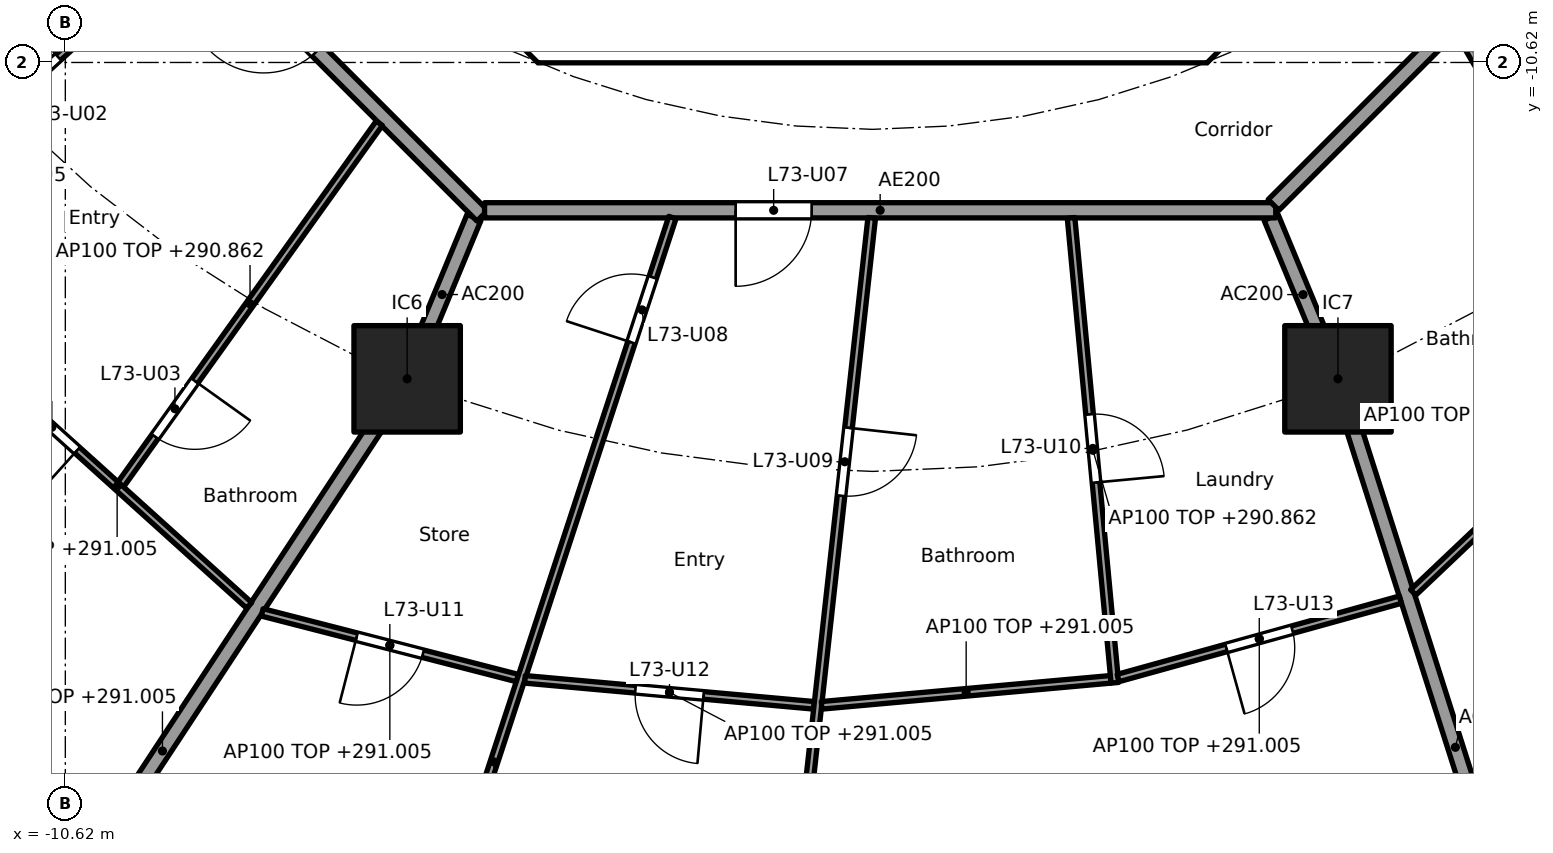
"""IFC4 building model, lengths in metres.
Left out: names, types, materials, properties, quantities, classifications, styles, units other than length and angle.
Written with IfcOpenShell. Run it as: python <this file> out.ifc"""

import sys

from ifc_helpers import new_model, si_unit, direction, frame, frame_2d, origin, origin_2d, place, context, subcontext, project, spatial, polyline, rectangle, outline, extrude, element, fill, save


model = new_model("IFC4")
c1 = context("Model", 3, precision=1e-05, world=origin(), true_north=direction((0.0, 1.0)))
c2 = subcontext(c1, "Body", "Model", "MODEL_VIEW")
j1 = project(units=[si_unit("LENGTHUNIT", "METRE"), si_unit("PLANEANGLEUNIT", "RADIAN")], contexts=[c1])
p1 = place(None, origin())
s1 = spatial("IfcSite", under=j1, at=p1, CompositionType="ELEMENT")
p2 = place(p1, origin())
s2 = spatial("IfcBuilding", under=s1, at=p2, CompositionType="ELEMENT")
p3 = place(p2, frame((0.0, 0.0, 288.1)))
s3 = spatial("IfcBuildingStorey", under=s2, at=p3, CompositionType="ELEMENT", Elevation=288.1)
for number, where, z_axis, x_axis in (
    (1, (-6.123, -14.782, 0.0), (0.0, 0.0, 1.0), (1.0, 0.0, 0.0)),
    (2, (6.123, -14.782, 0.0), (0.0, 0.0, 1.0), (1.0, 0.0, 0.0)),
):
    element("IfcColumn", number, at=place(p3, frame(where, z_axis=z_axis, x_axis=x_axis)), inside=s3, PredefinedType="COLUMN", context=c2, shape_type="SweptSolid", body=[
        extrude(rectangle(XDim=1.4, YDim=1.4, at=origin_2d()), origin(), (0.0, 0.0, 1.0), 3.7),
    ])
p4 = place(p3, origin())
e3 = element("IfcWall", 3, at=p4, inside=s3, PredefinedType="SHEAR", context=c2, shape_type="SweptSolid", body=[
    extrude(outline(polyline([(-4.152, -10.025), (4.152, -10.025), (4.401, -9.776), (4.825, -10.2), (4.401, -10.625), (-4.401, -10.625), (-4.825, -10.2), (-4.401, -9.776), (-4.152, -10.025)])), origin(), (0.0, 0.0, 1.0), 3.44),
])
p5 = place(p3, frame((-5.243, -12.657, 0.0), z_axis=(0.0, 0.0, 1.0), x_axis=(-0.382770106157, -0.923843626288, 0.0)))
e4 = element("IfcWall", 4, at=p5, inside=s3, PredefinedType="PARTITIONING", context=c2, shape_type="SweptSolid", body=[
    extrude(rectangle(XDim=2.199, YDim=0.2, at=frame_2d((1.1, 0.0))), origin(), (0.0, 0.0, 1.0), 3.44),
])
p6 = place(p3, frame((-6.151, -14.824, 0.0), z_axis=(0.0, 0.0, 1.0), x_axis=(-0.549345577828, -0.835595258556, 0.0)))
e5 = element("IfcWall", 5, at=p6, inside=s3, PredefinedType="PARTITIONING", context=c2, shape_type="SweptSolid", body=[
    extrude(rectangle(XDim=11.62, YDim=0.2, at=frame_2d((5.81, 0.0))), origin(), (0.0, 0.0, 1.0), 2.905),
])
p7 = place(p3, frame((5.243, -12.657, 0.0), z_axis=(0.0, 0.0, 1.0), x_axis=(0.382707856524, -0.923869415315, 0.0)))
e6 = element("IfcWall", 6, at=p7, inside=s3, PredefinedType="PARTITIONING", context=c2, shape_type="SweptSolid", body=[
    extrude(rectangle(XDim=2.2, YDim=0.2, at=frame_2d((1.1, 0.0))), origin(), (0.0, 0.0, 1.0), 3.44),
])
p8 = place(p3, frame((6.138, -14.83, 0.0), z_axis=(0.0, 0.0, 1.0), x_axis=(0.303653679037, -0.952782474234, 0.0)))
e7 = element("IfcWall", 7, at=p8, inside=s3, PredefinedType="PARTITIONING", context=c2, shape_type="SweptSolid", body=[
    extrude(rectangle(XDim=10.076, YDim=0.2, at=frame_2d((5.038, 0.0))), origin(), (0.0, 0.0, 1.0), 2.905),
])
p9 = place(p3, frame((-12.635, -5.134, 0.0), z_axis=(0.0, 0.0, 1.0), x_axis=(0.707106781187, -0.707106781187, 0.0)))
e8 = element("IfcWall", 8, at=p9, inside=s3, PredefinedType="PARTITIONING", context=c2, shape_type="SweptSolid", body=[
    extrude(rectangle(XDim=10.609, YDim=0.2, at=frame_2d((5.305, 0.0))), origin(), (0.0, 0.0, 1.0), 3.44),
])
p10 = place(p9, frame((6.539, 0.0, 0.0)))
e9 = element("IfcOpeningElement", 9, at=p10, cuts=e8, PredefinedType="OPENING", context=c2, shape_type="SweptSolid", body=[
    extrude(rectangle(XDim=1.0, YDim=2.1, at=frame_2d((0.5, 1.05))), frame((0.0, 0.11, 0.0), z_axis=(0.0, -1.0, 0.0), x_axis=(1.0, 0.0, 0.0)), (0.0, 0.0, 1.0), 0.22),
])
p11 = place(p3, frame((-5.104, -12.565, 0.0), z_axis=(0.0, 0.0, 1.0), x_axis=(1.0, 0.0, 0.0)))
e10 = element("IfcWall", 10, at=p11, inside=s3, PredefinedType="PARTITIONING", context=c2, shape_type="SweptSolid", body=[
    extrude(rectangle(XDim=10.409, YDim=0.2, at=frame_2d((5.205, 0.0))), origin(), (0.0, 0.0, 1.0), 3.44),
])
p12 = place(p11, frame((3.303, 0.0, 0.0)))
e11 = element("IfcOpeningElement", 11, at=p12, cuts=e10, PredefinedType="OPENING", context=c2, shape_type="SweptSolid", body=[
    extrude(rectangle(XDim=1.0, YDim=2.1, at=frame_2d((0.5, 1.05))), frame((0.0, 0.11, 0.0), z_axis=(0.0, -1.0, 0.0), x_axis=(1.0, 0.0, 0.0)), (0.0, 0.0, 1.0), 0.22),
])
p13 = place(p3, frame((5.275, -12.494, 0.0), z_axis=(0.0, 0.0, 1.0), x_axis=(0.707106781187, 0.707106781187, 0.0)))
e12 = element("IfcWall", 12, at=p13, inside=s3, PredefinedType="PARTITIONING", context=c2, shape_type="SweptSolid", body=[
    extrude(rectangle(XDim=10.409, YDim=0.2, at=frame_2d((5.205, 0.0))), origin(), (0.0, 0.0, 1.0), 3.44),
])
p14 = place(p13, frame((4.604, 0.0, 0.0)))
e13 = element("IfcOpeningElement", 13, at=p14, cuts=e12, PredefinedType="OPENING", context=c2, shape_type="SweptSolid", body=[
    extrude(rectangle(XDim=1.0, YDim=2.1, at=frame_2d((0.5, 1.05))), frame((0.0, 0.11, 0.0), z_axis=(0.0, -1.0, 0.0), x_axis=(1.0, 0.0, 0.0)), (0.0, 0.0, 1.0), 0.22),
])
p15 = place(p3, frame((-8.958, -8.952, 0.0), z_axis=(0.0, 0.0, 1.0), x_axis=(-0.73876526954, -0.673962815385, 0.0)))
e14 = element("IfcWall", 14, at=p15, inside=s3, PredefinedType="PARTITIONING", context=c2, shape_type="SweptSolid", body=[
    extrude(rectangle(XDim=5.647, YDim=0.1, at=frame_2d((2.824, 0.0))), origin(), (0.0, 0.0, 1.0), 2.762),
])
p16 = place(p15, frame((2.374, 0.0, 0.0)))
e15 = element("IfcOpeningElement", 15, at=p16, cuts=e14, PredefinedType="OPENING", context=c2, shape_type="SweptSolid", body=[
    extrude(rectangle(XDim=0.9, YDim=2.1, at=frame_2d((0.45, 1.05))), frame((0.0, 0.06, 0.0), z_axis=(0.0, -1.0, 0.0), x_axis=(1.0, 0.0, 0.0)), (0.0, 0.0, 1.0), 0.12),
])
p17 = place(p3, frame((-11.676, -14.628, 0.0), z_axis=(0.0, 0.0, 1.0), x_axis=(0.74245829867, -0.669892285921, 0.0)))
e16 = element("IfcWall", 16, at=p17, inside=s3, PredefinedType="PARTITIONING", context=c2, shape_type="SweptSolid", body=[
    extrude(rectangle(XDim=4.68, YDim=0.1, at=frame_2d((2.34, 0.0))), origin(), (0.0, 0.0, 1.0), 2.905),
])
p18 = place(p17, frame((0.732, 0.0, 0.0)))
e17 = element("IfcOpeningElement", 17, at=p18, cuts=e16, PredefinedType="OPENING", context=c2, shape_type="SweptSolid", body=[
    extrude(rectangle(XDim=0.9, YDim=2.1, at=frame_2d((0.45, 1.05))), frame((0.0, 0.06, 0.0), z_axis=(0.0, -1.0, 0.0), x_axis=(1.0, 0.0, 0.0)), (0.0, 0.0, 1.0), 0.12),
])
p19 = place(p3, frame((-6.49, -11.419, 0.0), z_axis=(0.0, 0.0, 1.0), x_axis=(-0.58201647594, -0.813176992871, 0.0)))
e18 = element("IfcWall", 18, at=p19, inside=s3, PredefinedType="PARTITIONING", context=c2, shape_type="SweptSolid", body=[
    extrude(rectangle(XDim=5.844, YDim=0.1, at=frame_2d((2.922, 0.0))), origin(), (0.0, 0.0, 1.0), 2.762),
])
p20 = place(p19, frame((4.169, 0.0, 0.0)))
e19 = element("IfcOpeningElement", 19, at=p20, cuts=e18, PredefinedType="OPENING", context=c2, shape_type="SweptSolid", body=[
    extrude(rectangle(XDim=0.9, YDim=2.1, at=frame_2d((0.45, 1.05))), frame((0.0, 0.06, 0.0), z_axis=(0.0, -1.0, 0.0), x_axis=(1.0, 0.0, 0.0)), (0.0, 0.0, 1.0), 0.12),
])
p21 = place(p3, frame((-8.03, -17.854, 0.0), z_axis=(0.0, 0.0, 1.0), x_axis=(0.968441967324, -0.249239154077, 0.0)))
e20 = element("IfcWall", 20, at=p21, inside=s3, PredefinedType="PARTITIONING", context=c2, shape_type="SweptSolid", body=[
    extrude(rectangle(XDim=3.468, YDim=0.1, at=frame_2d((1.734, 0.0))), origin(), (0.0, 0.0, 1.0), 2.905),
])
p22 = place(p21, frame((1.284, 0.0, 0.0)))
e21 = element("IfcOpeningElement", 21, at=p22, cuts=e20, PredefinedType="OPENING", context=c2, shape_type="SweptSolid", body=[
    extrude(rectangle(XDim=0.9, YDim=2.1, at=frame_2d((0.45, 1.05))), frame((0.0, 0.06, 0.0), z_axis=(0.0, -1.0, 0.0), x_axis=(1.0, 0.0, 0.0)), (0.0, 0.0, 1.0), 0.12),
])
p23 = place(p3, frame((-2.633, -12.66, 0.0), z_axis=(0.0, 0.0, 1.0), x_axis=(-0.311432955908, -0.950268127412, 0.0)))
e22 = element("IfcWall", 22, at=p23, inside=s3, PredefinedType="PARTITIONING", context=c2, shape_type="SweptSolid", body=[
    extrude(rectangle(XDim=15.074, YDim=0.1, at=frame_2d((7.537, 0.0))), origin(), (0.0, 0.0, 1.0), 2.762),
])
p24 = place(p23, frame((0.829, 0.0, 0.0)))
e23 = element("IfcOpeningElement", 23, at=p24, cuts=e22, PredefinedType="OPENING", context=c2, shape_type="SweptSolid", body=[
    extrude(rectangle(XDim=0.9, YDim=2.1, at=frame_2d((0.45, 1.05))), frame((0.0, 0.06, 0.0), z_axis=(0.0, -1.0, 0.0), x_axis=(1.0, 0.0, 0.0)), (0.0, 0.0, 1.0), 0.12),
])
p25 = place(p3, frame((-4.573, -18.736, 0.0), z_axis=(0.0, 0.0, 1.0), x_axis=(0.995986472869, -0.089503887414, 0.0)))
e24 = element("IfcWall", 24, at=p25, inside=s3, PredefinedType="PARTITIONING", context=c2, shape_type="SweptSolid", body=[
    extrude(rectangle(XDim=3.819, YDim=0.1, at=frame_2d((1.909, 0.0))), origin(), (0.0, 0.0, 1.0), 2.905),
])
p26 = place(p25, frame((1.459, 0.0, 0.0)))
e25 = element("IfcOpeningElement", 25, at=p26, cuts=e24, PredefinedType="OPENING", context=c2, shape_type="SweptSolid", body=[
    extrude(rectangle(XDim=0.9, YDim=2.1, at=frame_2d((0.45, 1.05))), frame((0.0, 0.06, 0.0), z_axis=(0.0, -1.0, 0.0), x_axis=(1.0, 0.0, 0.0)), (0.0, 0.0, 1.0), 0.12),
])
p27 = place(p3, frame((-0.011, -12.664, 0.0), z_axis=(0.0, 0.0, 1.0), x_axis=(-0.109805889692, -0.993953050495, 0.0)))
e26 = element("IfcWall", 26, at=p27, inside=s3, PredefinedType="PARTITIONING", context=c2, shape_type="SweptSolid", body=[
    extrude(rectangle(XDim=15.248, YDim=0.1, at=frame_2d((7.624, 0.0))), origin(), (0.0, 0.0, 1.0), 2.762),
])
p28 = place(p27, frame((2.778, 0.0, 0.0)))
e27 = element("IfcOpeningElement", 27, at=p28, cuts=e26, PredefinedType="OPENING", context=c2, shape_type="SweptSolid", body=[
    extrude(rectangle(XDim=0.9, YDim=2.1, at=frame_2d((0.45, 1.05))), frame((0.0, 0.06, 0.0), z_axis=(0.0, -1.0, 0.0), x_axis=(1.0, 0.0, 0.0)), (0.0, 0.0, 1.0), 0.12),
])
p29 = place(p3, frame((-0.67, -19.077, 0.0), z_axis=(0.0, 0.0, 1.0), x_axis=(0.995986472869, 0.089503887414, 0.0)))
e28 = element("IfcWall", 28, at=p29, inside=s3, PredefinedType="PARTITIONING", context=c2, shape_type="SweptSolid", body=[
    extrude(rectangle(XDim=3.819, YDim=0.1, at=frame_2d((1.909, 0.0))), origin(), (0.0, 0.0, 1.0), 2.905),
])
p30 = place(p3, frame((2.612, -12.664, 0.0), z_axis=(0.0, 0.0, 1.0), x_axis=(0.093781393779, -0.995592813444, 0.0)))
e29 = element("IfcWall", 29, at=p30, inside=s3, PredefinedType="PARTITIONING", context=c2, shape_type="SweptSolid", body=[
    extrude(rectangle(XDim=6.144, YDim=0.1, at=frame_2d((3.072, 0.0))), origin(), (0.0, 0.0, 1.0), 2.762),
])
p31 = place(p30, frame((2.597, 0.0, 0.0)))
e30 = element("IfcOpeningElement", 30, at=p31, cuts=e29, PredefinedType="OPENING", context=c2, shape_type="SweptSolid", body=[
    extrude(rectangle(XDim=0.9, YDim=2.1, at=frame_2d((0.45, 1.05))), frame((0.0, 0.06, 0.0), z_axis=(0.0, -1.0, 0.0), x_axis=(1.0, 0.0, 0.0)), (0.0, 0.0, 1.0), 0.12),
])
p32 = place(p3, frame((3.231, -18.718, 0.0), z_axis=(0.0, 0.0, 1.0), x_axis=(0.963606817151, 0.267323590318, 0.0)))
e31 = element("IfcWall", 31, at=p32, inside=s3, PredefinedType="PARTITIONING", context=c2, shape_type="SweptSolid", body=[
    extrude(rectangle(XDim=3.853, YDim=0.1, at=frame_2d((1.927, 0.0))), origin(), (0.0, 0.0, 1.0), 2.905),
])
p33 = place(p32, frame((1.477, 0.0, 0.0)))
e32 = element("IfcOpeningElement", 32, at=p33, cuts=e31, PredefinedType="OPENING", context=c2, shape_type="SweptSolid", body=[
    extrude(rectangle(XDim=0.9, YDim=2.1, at=frame_2d((0.45, 1.05))), frame((0.0, 0.06, 0.0), z_axis=(0.0, -1.0, 0.0), x_axis=(1.0, 0.0, 0.0)), (0.0, 0.0, 1.0), 0.12),
])
p34 = place(p3, frame((7.113, -17.592, 0.0), z_axis=(0.0, 0.0, 1.0), x_axis=(0.725433932329, 0.688291805723, 0.0)))
e33 = element("IfcWall", 33, at=p34, inside=s3, PredefinedType="PARTITIONING", context=c2, shape_type="SweptSolid", body=[
    extrude(rectangle(XDim=4.305, YDim=0.1, at=frame_2d((2.153, 0.0))), origin(), (0.0, 0.0, 1.0), 2.905),
])
p35 = place(p3, frame((7.708, -10.198, 0.0), z_axis=(0.0, 0.0, 1.0), x_axis=(0.503839015963, -0.863797572347, 0.0)))
e34 = element("IfcWall", 34, at=p35, inside=s3, PredefinedType="PARTITIONING", context=c2, shape_type="SweptSolid", body=[
    extrude(rectangle(XDim=11.856, YDim=0.1, at=frame_2d((5.928, 0.0))), origin(), (0.0, 0.0, 1.0), 2.762),
])
p36 = place(p35, frame((2.095, 0.0, 0.0)))
e35 = element("IfcOpeningElement", 35, at=p36, cuts=e34, PredefinedType="OPENING", context=c2, shape_type="SweptSolid", body=[
    extrude(rectangle(XDim=0.9, YDim=2.1, at=frame_2d((0.45, 1.05))), frame((0.0, 0.06, 0.0), z_axis=(0.0, -1.0, 0.0), x_axis=(1.0, 0.0, 0.0)), (0.0, 0.0, 1.0), 0.12),
])
p37 = place(p35, frame((8.023, 0.0, 0.0)))
e36 = element("IfcOpeningElement", 36, at=p37, cuts=e34, PredefinedType="OPENING", context=c2, shape_type="SweptSolid", body=[
    extrude(rectangle(XDim=0.9, YDim=2.1, at=frame_2d((0.45, 1.05))), frame((0.0, 0.06, 0.0), z_axis=(0.0, -1.0, 0.0), x_axis=(1.0, 0.0, 0.0)), (0.0, 0.0, 1.0), 0.12),
])
p38 = place(p16, frame((0.9, 0.0, 0.0), x_axis=(-1.0, 0.0, 0.0)))
e37 = element("IfcDoor", 37, at=p38, inside=s3, OperationType="SINGLE_SWING_LEFT", PredefinedType="DOOR", context=c2, shape_type="SweptSolid", body=[
    extrude(rectangle(XDim=0.9, YDim=2.1, at=frame_2d((0.45, 1.05))), frame((0.0, 0.025, 0.0), z_axis=(0.0, -1.0, 0.0), x_axis=(1.0, 0.0, 0.0)), (0.0, 0.0, 1.0), 0.05),
])
fill(e15, e37)
p39 = place(p20, origin())
e38 = element("IfcDoor", 38, at=p39, inside=s3, OperationType="SINGLE_SWING_LEFT", PredefinedType="DOOR", context=c2, shape_type="SweptSolid", body=[
    extrude(rectangle(XDim=0.9, YDim=2.1, at=frame_2d((0.45, 1.05))), frame((0.0, 0.025, 0.0), z_axis=(0.0, -1.0, 0.0), x_axis=(1.0, 0.0, 0.0)), (0.0, 0.0, 1.0), 0.05),
])
fill(e19, e38)
p40 = place(p18, frame((0.9, 0.0, 0.0), x_axis=(-1.0, 0.0, 0.0)))
e39 = element("IfcDoor", 39, at=p40, inside=s3, OperationType="SINGLE_SWING_LEFT", PredefinedType="DOOR", context=c2, shape_type="SweptSolid", body=[
    extrude(rectangle(XDim=0.9, YDim=2.1, at=frame_2d((0.45, 1.05))), frame((0.0, 0.025, 0.0), z_axis=(0.0, -1.0, 0.0), x_axis=(1.0, 0.0, 0.0)), (0.0, 0.0, 1.0), 0.05),
])
fill(e17, e39)
p41 = place(p12, frame((1.0, 0.0, 0.0), x_axis=(-1.0, 0.0, 0.0)))
e40 = element("IfcDoor", 40, at=p41, inside=s3, OperationType="SINGLE_SWING_RIGHT", PredefinedType="DOOR", context=c2, shape_type="SweptSolid", body=[
    extrude(rectangle(XDim=1.0, YDim=2.1, at=frame_2d((0.5, 1.05))), frame((0.0, 0.025, 0.0), z_axis=(0.0, -1.0, 0.0), x_axis=(1.0, 0.0, 0.0)), (0.0, 0.0, 1.0), 0.05),
])
fill(e11, e40)
p42 = place(p24, frame((0.9, 0.0, 0.0), x_axis=(-1.0, 0.0, 0.0)))
e41 = element("IfcDoor", 41, at=p42, inside=s3, OperationType="SINGLE_SWING_LEFT", PredefinedType="DOOR", context=c2, shape_type="SweptSolid", body=[
    extrude(rectangle(XDim=0.9, YDim=2.1, at=frame_2d((0.45, 1.05))), frame((0.0, 0.025, 0.0), z_axis=(0.0, -1.0, 0.0), x_axis=(1.0, 0.0, 0.0)), (0.0, 0.0, 1.0), 0.05),
])
fill(e23, e41)
p43 = place(p28, origin())
e42 = element("IfcDoor", 42, at=p43, inside=s3, OperationType="SINGLE_SWING_LEFT", PredefinedType="DOOR", context=c2, shape_type="SweptSolid", body=[
    extrude(rectangle(XDim=0.9, YDim=2.1, at=frame_2d((0.45, 1.05))), frame((0.0, 0.025, 0.0), z_axis=(0.0, -1.0, 0.0), x_axis=(1.0, 0.0, 0.0)), (0.0, 0.0, 1.0), 0.05),
])
fill(e27, e42)
p44 = place(p31, origin())
e43 = element("IfcDoor", 43, at=p44, inside=s3, OperationType="SINGLE_SWING_RIGHT", PredefinedType="DOOR", context=c2, shape_type="SweptSolid", body=[
    extrude(rectangle(XDim=0.9, YDim=2.1, at=frame_2d((0.45, 1.05))), frame((0.0, 0.025, 0.0), z_axis=(0.0, -1.0, 0.0), x_axis=(1.0, 0.0, 0.0)), (0.0, 0.0, 1.0), 0.05),
])
fill(e30, e43)
p45 = place(p22, frame((0.9, 0.0, 0.0), x_axis=(-1.0, 0.0, 0.0)))
e44 = element("IfcDoor", 44, at=p45, inside=s3, OperationType="SINGLE_SWING_RIGHT", PredefinedType="DOOR", context=c2, shape_type="SweptSolid", body=[
    extrude(rectangle(XDim=0.9, YDim=2.1, at=frame_2d((0.45, 1.05))), frame((0.0, 0.025, 0.0), z_axis=(0.0, -1.0, 0.0), x_axis=(1.0, 0.0, 0.0)), (0.0, 0.0, 1.0), 0.05),
])
fill(e21, e44)
p46 = place(p26, frame((0.9, 0.0, 0.0), x_axis=(-1.0, 0.0, 0.0)))
e45 = element("IfcDoor", 45, at=p46, inside=s3, OperationType="SINGLE_SWING_LEFT", PredefinedType="DOOR", context=c2, shape_type="SweptSolid", body=[
    extrude(rectangle(XDim=0.9, YDim=2.1, at=frame_2d((0.45, 1.05))), frame((0.0, 0.025, 0.0), z_axis=(0.0, -1.0, 0.0), x_axis=(1.0, 0.0, 0.0)), (0.0, 0.0, 1.0), 0.05),
])
fill(e25, e45)
p47 = place(p33, frame((0.9, 0.0, 0.0), x_axis=(-1.0, 0.0, 0.0)))
e46 = element("IfcDoor", 46, at=p47, inside=s3, OperationType="SINGLE_SWING_RIGHT", PredefinedType="DOOR", context=c2, shape_type="SweptSolid", body=[
    extrude(rectangle(XDim=0.9, YDim=2.1, at=frame_2d((0.45, 1.05))), frame((0.0, 0.025, 0.0), z_axis=(0.0, -1.0, 0.0), x_axis=(1.0, 0.0, 0.0)), (0.0, 0.0, 1.0), 0.05),
])
fill(e32, e46)
save(model, sys.argv[1])
